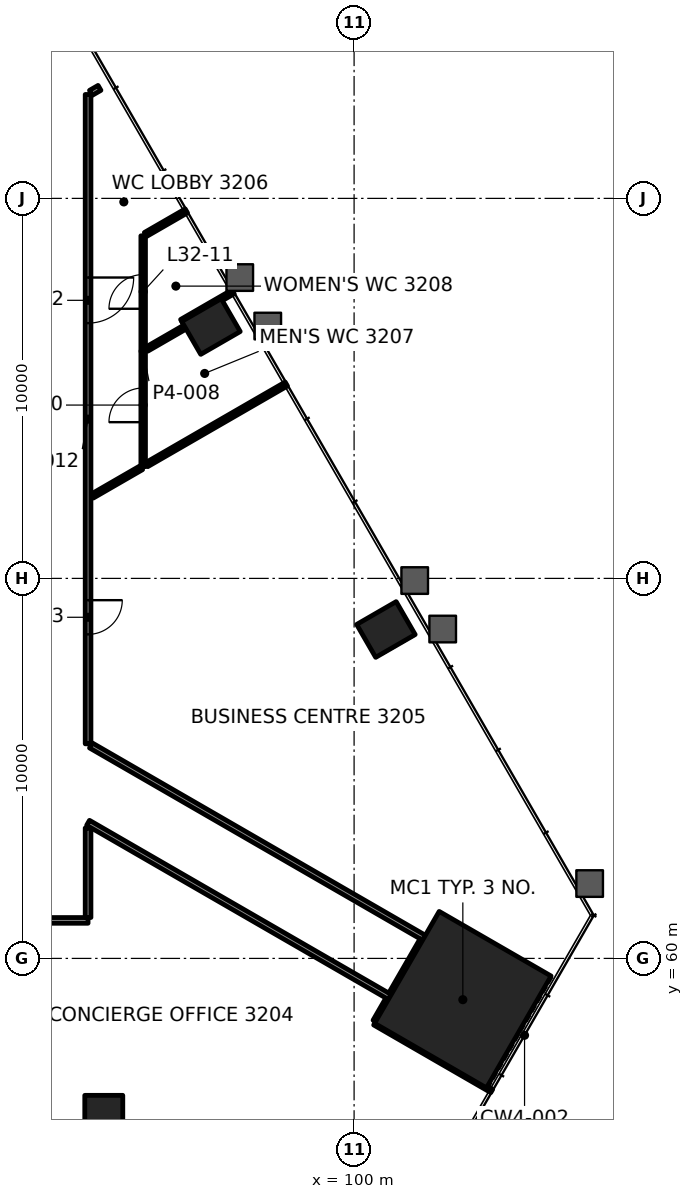
"""IFC4 building model, lengths in metres.
Left out: names, types, materials, properties, quantities, classifications, styles, units other than length and angle.
Written with IfcOpenShell. Run it as: python <this file> out.ifc"""

import sys

from ifc_helpers import new_model, si_unit, direction, frame, frame_2d, origin, origin_2d, place, context, subcontext, project, spatial, rectangle, extrude, element, fill, save


model = new_model("IFC4")
c1 = context("Model", 3, precision=1e-05, world=origin(), true_north=direction((0.0, 1.0)))
c2 = subcontext(c1, "Body", "Model", "MODEL_VIEW")
j1 = project(units=[si_unit("LENGTHUNIT", "METRE"), si_unit("PLANEANGLEUNIT", "RADIAN")], contexts=[c1])
p1 = place(None, origin())
s1 = spatial("IfcSite", under=j1, at=p1, CompositionType="ELEMENT")
p2 = place(p1, origin())
s2 = spatial("IfcBuilding", under=s1, at=p2, CompositionType="ELEMENT")
p3 = place(p2, frame((0.0, 0.0, 140.8)))
s3 = spatial("IfcBuildingStorey", under=s2, at=p3, CompositionType="ELEMENT", Elevation=140.8)
p4 = place(p3, frame((102.861, 58.914, 0.0), z_axis=(0.0, 0.0, 1.0), x_axis=(0.5, 0.866025403784, 0.0)))
e1 = element("IfcColumn", 1, at=p4, inside=s3, PredefinedType="COLUMN", context=c2, shape_type="SweptSolid", body=[
    extrude(rectangle(XDim=3.4, YDim=3.4, at=origin_2d()), origin(), (0.0, 0.0, 1.0), 6.0),
])
for number, where, z_axis, x_axis in (
    (2, (93.414, 55.797, -0.0), (0.0, 0.0, 1.0), (1.0, 0.0, 0.0)),
    (3, (100.837, 68.655, -0.0), (0.0, 0.0, 1.0), (-0.5, 0.866, 0.0)),
    (4, (96.234, 76.628, -0.0), (0.0, 0.0, 1.0), (-0.5, 0.866, 0.0)),
):
    element("IfcColumn", number, at=place(p3, frame(where, z_axis=z_axis, x_axis=x_axis)), inside=s3, PredefinedType="COLUMN", context=c2, shape_type="SweptSolid", body=[
        extrude(rectangle(XDim=1.0, YDim=1.2, at=origin_2d()), origin(), (0.0, 0.0, 1.0), 6.0),
    ])
p5 = place(p3, frame((93.0, 61.0, 0.0), z_axis=(0.0, 0.0, 1.0), x_axis=(-1.0, 0.0, 0.0)))
e5 = element("IfcWall", 5, at=p5, inside=s3, PredefinedType="PARTITIONING", context=c2, shape_type="SweptSolid", body=[
    extrude(rectangle(XDim=35.999, YDim=0.15, at=frame_2d((18.0, 0.0))), origin(), (0.0, 0.0, 1.0), 4.95),
])
p6 = place(p5, frame((4.048, 0.0, 0.0)))
e6 = element("IfcOpeningElement", 6, at=p6, cuts=e5, PredefinedType="OPENING", context=c2, shape_type="SweptSolid", body=[
    extrude(rectangle(XDim=0.9, YDim=2.1, at=frame_2d((0.45, 1.05))), frame((0.0, 0.085, 0.0), z_axis=(0.0, -1.0, 0.0), x_axis=(1.0, 0.0, 0.0)), (0.0, 0.0, 1.0), 0.17),
])
p7 = place(p5, frame((17.55, 0.0, 0.0)))
e7 = element("IfcOpeningElement", 7, at=p7, cuts=e5, PredefinedType="OPENING", context=c2, shape_type="SweptSolid", body=[
    extrude(rectangle(XDim=0.9, YDim=2.1, at=frame_2d((0.45, 1.05))), frame((0.0, 0.085, 0.0), z_axis=(0.0, -1.0, 0.0), x_axis=(1.0, 0.0, 0.0)), (0.0, 0.0, 1.0), 0.17),
])
p8 = place(p5, frame((31.051, 0.0, 0.0)))
e8 = element("IfcOpeningElement", 8, at=p8, cuts=e5, PredefinedType="OPENING", context=c2, shape_type="SweptSolid", body=[
    extrude(rectangle(XDim=0.9, YDim=2.1, at=frame_2d((0.45, 1.05))), frame((0.0, 0.085, 0.0), z_axis=(0.0, -1.0, 0.0), x_axis=(1.0, 0.0, 0.0)), (0.0, 0.0, 1.0), 0.17),
])
p9 = place(p3, frame((93.11, 72.167, 0.0), z_axis=(0.0, 0.0, 1.0), x_axis=(0.866055123991, 0.49994851956, 0.0)))
e9 = element("IfcWall", 9, at=p9, inside=s3, PredefinedType="PARTITIONING", context=c2, shape_type="SweptSolid", body=[
    extrude(rectangle(XDim=1.496, YDim=0.12, at=frame_2d((0.748, 0.0))), origin(), (0.0, 0.0, 1.0), 4.95),
])
p10 = place(p3, frame((94.545, 76.033, 0.0), z_axis=(0.0, 0.0, 1.0), x_axis=(0.865982457891, 0.500074377092, 0.0)))
e10 = element("IfcWall", 10, at=p10, inside=s3, PredefinedType="PARTITIONING", context=c2, shape_type="SweptSolid", body=[
    extrude(rectangle(XDim=1.161, YDim=0.12, at=frame_2d((0.581, 0.0))), origin(), (0.0, 0.0, 1.0), 4.95),
])
p11 = place(p3, frame((95.465, 76.761, 0.0), z_axis=(0.0, 0.0, 1.0), x_axis=(0.865990094875, 0.500061151839, 0.0)))
e11 = element("IfcWall", 11, at=p11, inside=s3, PredefinedType="PARTITIONING", context=c2, shape_type="SweptSolid", body=[
    extrude(rectangle(XDim=1.56, YDim=0.12, at=frame_2d((0.78, 0.0))), origin(), (0.0, 0.0, 1.0), 4.715),
])
p12 = place(p3, frame((94.51, 79.05, 0.0), z_axis=(0.0, 0.0, 1.0), x_axis=(0.866008831286, 0.500028703312, 0.0)))
e12 = element("IfcWall", 12, at=p12, inside=s3, PredefinedType="PARTITIONING", context=c2, shape_type="SweptSolid", body=[
    extrude(rectangle(XDim=1.242, YDim=0.12, at=frame_2d((0.621, 0.0))), origin(), (0.0, 0.0, 1.0), 4.715),
])
p13 = place(p3, frame((93.075, 82.778, 0.0), z_axis=(0.0, 0.0, 1.0), x_axis=(0.865874074141, 0.500262019077, 0.0)))
e13 = element("IfcWall", 13, at=p13, inside=s3, PredefinedType="PARTITIONING", context=c2, shape_type="SweptSolid", body=[
    extrude(rectangle(XDim=0.261, YDim=0.15, at=frame_2d((0.13, 0.0))), origin(), (0.0, 0.0, 1.0), 4.95),
])
p14 = place(p3, frame((100.564, 58.336, 0.0), z_axis=(0.0, 0.0, 1.0), x_axis=(0.500108776725, 0.865962592404, 0.0)))
e14 = element("IfcWall", 14, at=p14, inside=s3, PredefinedType="PARTITIONING", context=c2, shape_type="SweptSolid", body=[
    extrude(rectangle(XDim=0.675, YDim=0.15, at=frame_2d((0.337, 0.0))), origin(), (0.0, 0.0, 1.0), 4.95),
])
p15 = place(p3, frame((94.45, 72.941, 0.0), z_axis=(0.0, 0.0, 1.0), x_axis=(0.0, 1.0, 0.0)))
e15 = element("IfcWall", 15, at=p15, inside=s3, PredefinedType="PARTITIONING", context=c2, shape_type="SweptSolid", body=[
    extrude(rectangle(XDim=6.075, YDim=0.12, at=frame_2d((3.038, 0.0))), origin(), (0.0, 0.0, 1.0), 4.95),
])
p16 = place(p15, frame((1.17, 0.0, 0.0)))
e16 = element("IfcOpeningElement", 16, at=p16, cuts=e15, PredefinedType="OPENING", context=c2, shape_type="SweptSolid", body=[
    extrude(rectangle(XDim=0.9, YDim=2.1, at=frame_2d((0.45, 1.05))), frame((0.0, 0.07, 0.0), z_axis=(0.0, -1.0, 0.0), x_axis=(1.0, 0.0, 0.0)), (0.0, 0.0, 1.0), 0.14),
])
p17 = place(p15, frame((4.155, 0.0, 0.0)))
e17 = element("IfcOpeningElement", 17, at=p17, cuts=e15, PredefinedType="OPENING", context=c2, shape_type="SweptSolid", body=[
    extrude(rectangle(XDim=0.9, YDim=2.1, at=frame_2d((0.45, 1.05))), frame((0.0, 0.07, 0.0), z_axis=(0.0, -1.0, 0.0), x_axis=(1.0, 0.0, 0.0)), (0.0, 0.0, 1.0), 0.14),
])
p18 = place(p3, frame((93.0, 61.075, 0.0), z_axis=(0.0, 0.0, 1.0), x_axis=(0.0, 1.0, 0.0)))
e18 = element("IfcWall", 18, at=p18, inside=s3, PredefinedType="PARTITIONING", context=c2, shape_type="SweptSolid", body=[
    extrude(rectangle(XDim=2.356, YDim=0.15, at=frame_2d((1.178, 0.0))), origin(), (0.0, 0.0, 1.0), 4.95),
])
p19 = place(p3, frame((93.0, 82.735, 0.0), z_axis=(0.0, 0.0, 1.0), x_axis=(0.0, -1.0, 0.0)))
e19 = element("IfcWall", 19, at=p19, inside=s3, PredefinedType="PARTITIONING", context=c2, shape_type="SweptSolid", body=[
    extrude(rectangle(XDim=17.088, YDim=0.15, at=frame_2d((8.544, 0.0))), origin(), (0.0, 0.0, 1.0), 4.715),
])
p20 = place(p19, frame((4.817, 0.0, 0.0)))
e20 = element("IfcOpeningElement", 20, at=p20, cuts=e19, PredefinedType="OPENING", context=c2, shape_type="SweptSolid", body=[
    extrude(rectangle(XDim=1.2, YDim=2.1, at=frame_2d((0.6, 1.05))), frame((0.0, 0.085, 0.0), z_axis=(0.0, -1.0, 0.0), x_axis=(1.0, 0.0, 0.0)), (0.0, 0.0, 1.0), 0.17),
])
p21 = place(p19, frame((13.308, 0.0, 0.0)))
e21 = element("IfcOpeningElement", 21, at=p21, cuts=e19, PredefinedType="OPENING", context=c2, shape_type="SweptSolid", body=[
    extrude(rectangle(XDim=0.9, YDim=2.1, at=frame_2d((0.45, 1.05))), frame((0.0, 0.085, 0.0), z_axis=(0.0, -1.0, 0.0), x_axis=(1.0, 0.0, 0.0)), (0.0, 0.0, 1.0), 0.17),
])
p22 = place(p3, frame((101.839, 60.544, 0.0), z_axis=(0.0, 0.0, 1.0), x_axis=(-0.86602086214, 0.500007866276, 0.0)))
e22 = element("IfcWall", 22, at=p22, inside=s3, PredefinedType="PARTITIONING", context=c2, shape_type="SweptSolid", body=[
    extrude(rectangle(XDim=10.119, YDim=0.15, at=frame_2d((5.06, 0.0))), origin(), (0.0, 0.0, 1.0), 4.95),
])
p23 = place(p3, frame((100.939, 58.985, 0.0), z_axis=(0.0, 0.0, 1.0), x_axis=(-0.866023713276, 0.500002928035, 0.0)))
e23 = element("IfcWall", 23, at=p23, inside=s3, PredefinedType="PARTITIONING", context=c2, shape_type="SweptSolid", body=[
    extrude(rectangle(XDim=9.167, YDim=0.15, at=frame_2d((4.584, 0.0))), origin(), (0.0, 0.0, 1.0), 4.797),
])
p24 = place(p3, frame((103.622, 56.512, 0.0), z_axis=(0.0, 0.0, 1.0), x_axis=(-0.866031398331, 0.499989616998, 0.0)))
e24 = element("IfcWall", 24, at=p24, inside=s3, PredefinedType="PARTITIONING", context=c2, shape_type="SweptSolid", body=[
    extrude(rectangle(XDim=3.56, YDim=0.1, at=frame_2d((1.78, 0.0))), origin(), (0.0, 0.0, 1.0), 4.95),
])
p25 = place(p3, frame((94.54, 72.992, 0.0), z_axis=(0.0, 0.0, 1.0), x_axis=(0.866033315223, 0.499986296736, 0.0)))
e25 = element("IfcWall", 25, at=p25, inside=s3, PredefinedType="PARTITIONING", context=c2, shape_type="SweptSolid", body=[
    extrude(rectangle(XDim=4.245, YDim=0.12, at=frame_2d((2.123, 0.0))), origin(), (0.0, 0.0, 1.0), 4.715),
])
p26 = place(p3, frame((100.976, 59.05, 0.0), z_axis=(0.0, 0.0, 1.0), x_axis=(0.499991515992, 0.866030301974, 0.0)))
e26 = element("IfcWall", 26, at=p26, inside=s3, PredefinedType="PARTITIONING", context=c2, shape_type="SweptSolid", body=[
    extrude(rectangle(XDim=1.649, YDim=0.15, at=frame_2d((0.825, 0.0))), origin(), (0.0, 0.0, 1.0), 4.797),
])
p27 = place(p16, origin())
e27 = element("IfcDoor", 27, at=p27, inside=s3, OperationType="SINGLE_SWING_RIGHT", PredefinedType="DOOR", context=c2, shape_type="SweptSolid", body=[
    extrude(rectangle(XDim=0.9, YDim=2.1, at=frame_2d((0.45, 1.05))), frame((0.0, 0.025, 0.0), z_axis=(0.0, -1.0, 0.0), x_axis=(1.0, 0.0, 0.0)), (0.0, 0.0, 1.0), 0.05),
])
fill(e16, e27)
p28 = place(p17, origin())
e28 = element("IfcDoor", 28, at=p28, inside=s3, OperationType="SINGLE_SWING_LEFT", PredefinedType="DOOR", context=c2, shape_type="SweptSolid", body=[
    extrude(rectangle(XDim=0.9, YDim=2.1, at=frame_2d((0.45, 1.05))), frame((0.0, 0.025, 0.0), z_axis=(0.0, -1.0, 0.0), x_axis=(1.0, 0.0, 0.0)), (0.0, 0.0, 1.0), 0.05),
])
fill(e17, e28)
p29 = place(p20, origin())
e29 = element("IfcDoor", 29, at=p29, inside=s3, OperationType="DOUBLE_DOOR_SINGLE_SWING", PredefinedType="DOOR", context=c2, shape_type="SweptSolid", body=[
    extrude(rectangle(XDim=1.2, YDim=2.1, at=frame_2d((0.6, 1.05))), frame((0.0, 0.025, 0.0), z_axis=(0.0, -1.0, 0.0), x_axis=(1.0, 0.0, 0.0)), (0.0, 0.0, 1.0), 0.05),
])
fill(e20, e29)
p30 = place(p21, origin())
e30 = element("IfcDoor", 30, at=p30, inside=s3, OperationType="SINGLE_SWING_LEFT", PredefinedType="DOOR", context=c2, shape_type="SweptSolid", body=[
    extrude(rectangle(XDim=0.9, YDim=2.1, at=frame_2d((0.45, 1.05))), frame((0.0, 0.025, 0.0), z_axis=(0.0, -1.0, 0.0), x_axis=(1.0, 0.0, 0.0)), (0.0, 0.0, 1.0), 0.05),
])
fill(e21, e30)
save(model, sys.argv[1])
